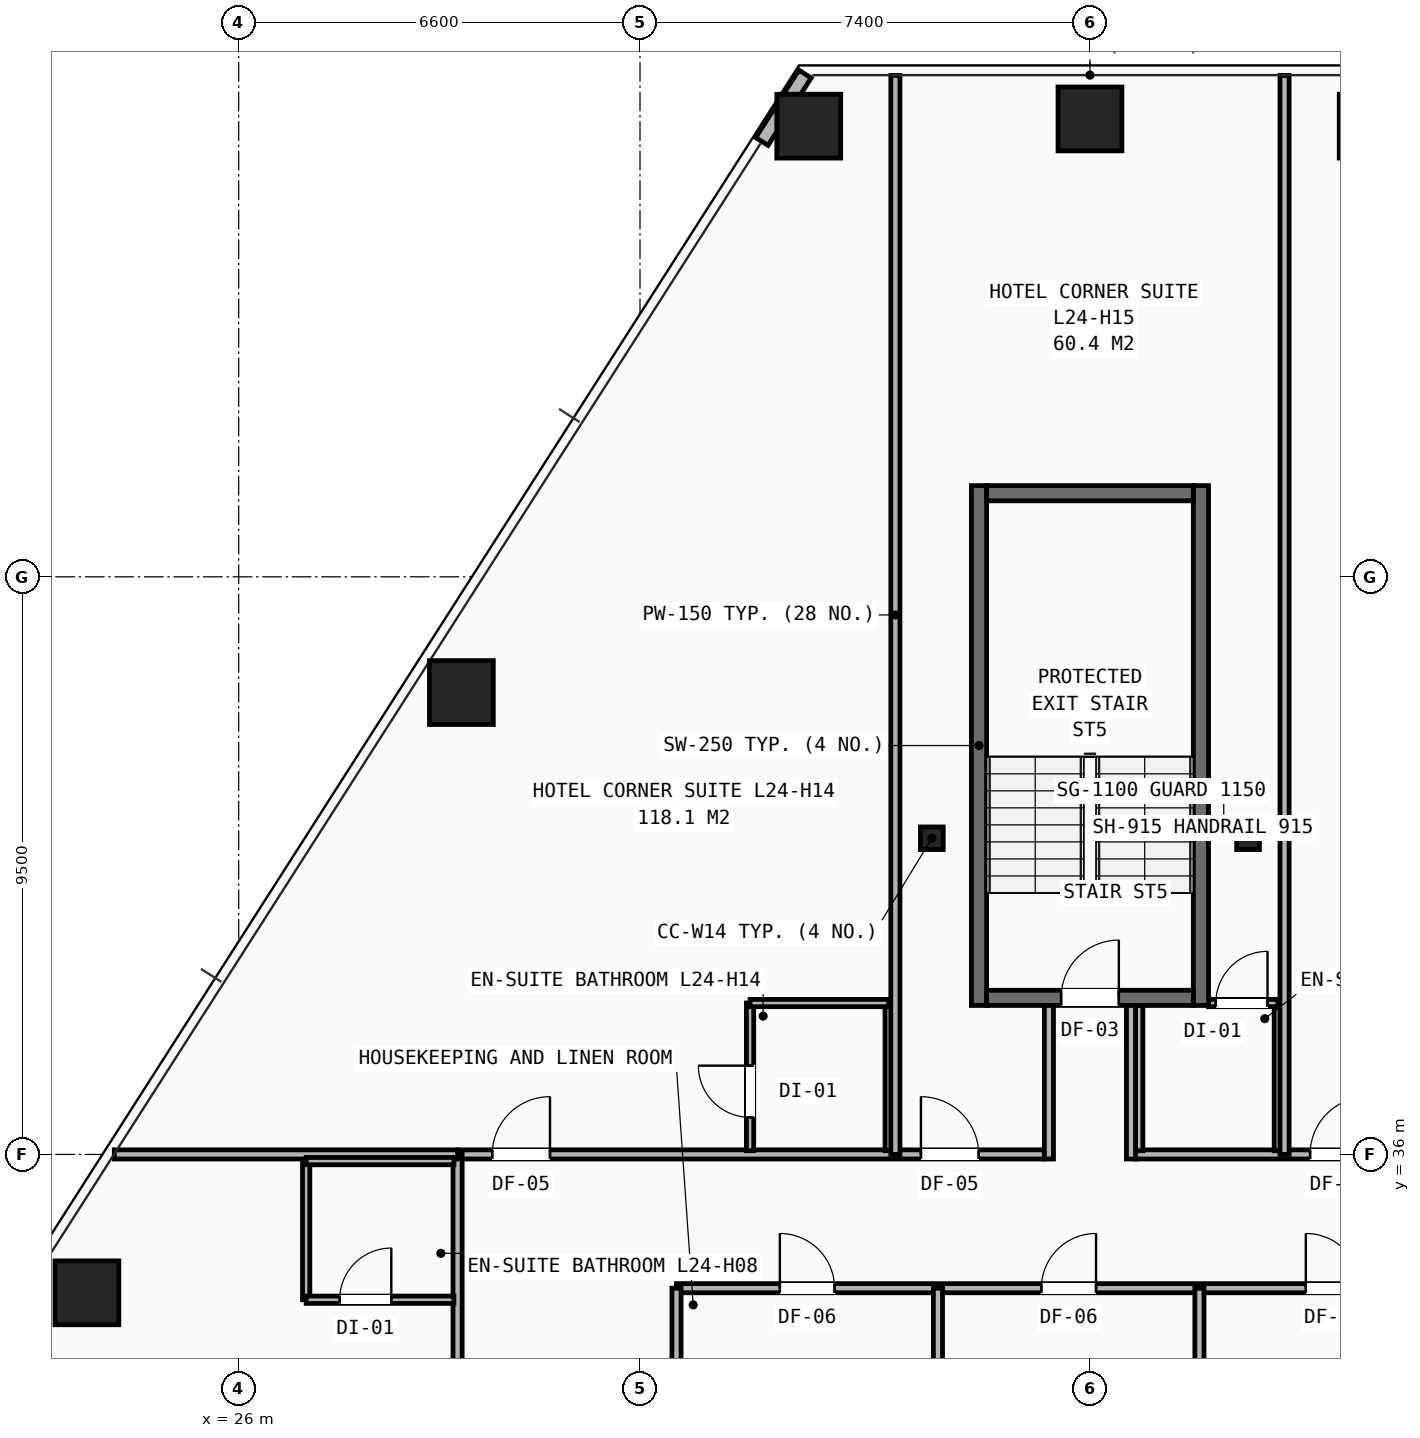
"""IFC4 building model, lengths in metres.
Left out: names, types, materials, properties, quantities, classifications, styles, units other than length and angle.
Written with IfcOpenShell. Run it as: python <this file> out.ifc"""

import sys

from ifc_helpers import new_model, si_unit, direction, frame, frame_2d, origin, origin_2d, place, context, subcontext, project, spatial, rectangle, hollow_rectangle, i_section, extrude, element, fill, save


model = new_model("IFC4")
c1 = context("Model", 3, precision=1e-05, world=origin(), true_north=direction((0.0, 1.0)))
c2 = subcontext(c1, "Body", "Model", "MODEL_VIEW")
j1 = project(units=[si_unit("LENGTHUNIT", "METRE"), si_unit("PLANEANGLEUNIT", "RADIAN")], contexts=[c1])
p1 = place(None, origin())
s1 = spatial("IfcSite", under=j1, at=p1, CompositionType="ELEMENT")
p2 = place(p1, origin())
s2 = spatial("IfcBuilding", under=s1, at=p2, CompositionType="ELEMENT")
p3 = place(p2, frame((0.0, 0.0, 86.2)))
s3 = spatial("IfcBuildingStorey", under=s2, at=p3, CompositionType="ELEMENT", Elevation=86.2)
for number, where, z_axis, x_axis in (
    (1, (37.4, 41.2, 0.0), (0.0, 0.0, 1.0), (1.0, 0.0, 0.0)),
    (2, (42.6, 41.2, 0.0), (0.0, 0.0, 1.0), (1.0, 0.0, 0.0)),
):
    element("IfcColumn", number, at=place(p3, frame(where, z_axis=z_axis, x_axis=x_axis)), inside=s3, PredefinedType="COLUMN", context=c2, shape_type="SweptSolid", body=[
        extrude(i_section(OverallWidth=0.374, OverallDepth=0.372, WebThickness=0.016, FlangeThickness=0.026, at=origin_2d()), origin(), (0.0, 0.0, 1.0), 3.2),
    ])
for number, where, z_axis, x_axis in (
    (3, (44.625, 52.912, 0.0), (0.0, 0.0, 1.0), (1.0, 0.0, 0.0)),
    (4, (40.0, 53.031, 0.0), (0.0, 0.0, 1.0), (1.0, 0.0, 0.0)),
    (5, (35.375, 52.912, 0.0), (0.0, 0.0, 1.0), (1.0, 0.0, 0.0)),
    (6, (29.662, 43.596, 0.0), (0.0, 0.0, 1.0), (1.0, 0.0, 0.0)),
    (7, (23.504, 33.724, 0.0), (0.0, 0.0, 1.0), (1.0, 0.0, 0.0)),
):
    element("IfcColumn", number, at=place(p3, frame(where, z_axis=z_axis, x_axis=x_axis)), inside=s3, PredefinedType="COLUMN", context=c2, shape_type="SweptSolid", body=[
        extrude(hollow_rectangle(XDim=1.05, YDim=1.05, WallThickness=0.07, at=origin_2d()), origin(), (0.0, 0.0, 1.0), 3.2),
    ])
p4 = place(p3, frame((35.314, 53.769, 0.0), z_axis=(0.0, 0.0, 1.0), x_axis=(-0.538937912301, -0.842345491283, 0.0)))
e8 = element("IfcWall", 8, at=p4, inside=s3, PredefinedType="SHEAR", context=c2, shape_type="SweptSolid", body=[
    extrude(rectangle(XDim=1.316, YDim=0.24, at=frame_2d((0.658, 0.0))), origin(), (0.0, 0.0, 1.0), 2.253),
])
p5 = place(p3, frame((33.2, 33.8, 0.0), z_axis=(0.0, 0.0, 1.0), x_axis=(1.0, 0.0, 0.0)))
e9 = element("IfcWall", 9, at=p5, inside=s3, PredefinedType="PARTITIONING", context=c2, shape_type="SweptSolid", body=[
    extrude(rectangle(XDim=13.0, YDim=0.15, at=frame_2d((6.5, 0.0))), origin(), (0.0, 0.0, 1.0), 2.97),
])
p6 = place(p5, frame((1.7, 0.0, 0.0)))
e10 = element("IfcOpeningElement", 10, at=p6, cuts=e9, PredefinedType="OPENING", context=c2, shape_type="SweptSolid", body=[
    extrude(rectangle(XDim=0.9, YDim=2.1, at=frame_2d((0.45, 1.05))), frame((0.0, 0.085, 0.0), z_axis=(0.0, -1.0, 0.0), x_axis=(1.0, 0.0, 0.0)), (0.0, 0.0, 1.0), 0.17),
])
p7 = place(p5, frame((6.0, 0.0, 0.0)))
e11 = element("IfcOpeningElement", 11, at=p7, cuts=e9, PredefinedType="OPENING", context=c2, shape_type="SweptSolid", body=[
    extrude(rectangle(XDim=0.9, YDim=2.1, at=frame_2d((0.45, 1.05))), frame((0.0, 0.085, 0.0), z_axis=(0.0, -1.0, 0.0), x_axis=(1.0, 0.0, 0.0)), (0.0, 0.0, 1.0), 0.17),
])
p8 = place(p5, frame((10.35, 0.0, 0.0)))
e12 = element("IfcOpeningElement", 12, at=p8, cuts=e9, PredefinedType="OPENING", context=c2, shape_type="SweptSolid", body=[
    extrude(rectangle(XDim=0.9, YDim=2.1, at=frame_2d((0.45, 1.05))), frame((0.0, 0.085, 0.0), z_axis=(0.0, -1.0, 0.0), x_axis=(1.0, 0.0, 0.0)), (0.0, 0.0, 1.0), 0.17),
])
for number, where, z_axis, x_axis in (
    (13, (33.2, 31.2, 0.0), (0.0, 0.0, 1.0), (0.0, 1.0, 0.0)),
    (14, (37.5, 31.2, 0.0), (0.0, 0.0, 1.0), (0.0, 1.0, 0.0)),
    (15, (41.8, 31.2, 0.0), (0.0, 0.0, 1.0), (0.0, 1.0, 0.0)),
):
    element("IfcWall", number, at=place(p3, frame(where, z_axis=z_axis, x_axis=x_axis)), inside=s3, PredefinedType="PARTITIONING", context=c2, shape_type="SweptSolid", body=[
        extrude(rectangle(XDim=2.6, YDim=0.15, at=frame_2d((1.3, 0.0))), origin(), (0.0, 0.0, 1.0), 2.421),
    ])
p9 = place(p3, frame((29.6, 36.0, 0.0), z_axis=(0.0, 0.0, 1.0), x_axis=(1.0, 0.0, 0.0)))
e16 = element("IfcWall", 16, at=p9, inside=s3, PredefinedType="PARTITIONING", context=c2, shape_type="SweptSolid", body=[
    extrude(rectangle(XDim=9.65, YDim=0.15, at=frame_2d((4.825, 0.0))), origin(), (0.0, 0.0, 1.0), 2.503),
])
p10 = place(p9, frame((0.57, 0.0, 0.0)))
e17 = element("IfcOpeningElement", 17, at=p10, cuts=e16, PredefinedType="OPENING", context=c2, shape_type="SweptSolid", body=[
    extrude(rectangle(XDim=0.95, YDim=2.1, at=frame_2d((0.475, 1.05))), frame((0.0, 0.085, 0.0), z_axis=(0.0, -1.0, 0.0), x_axis=(1.0, 0.0, 0.0)), (0.0, 0.0, 1.0), 0.17),
])
p11 = place(p9, frame((7.62, 0.0, 0.0)))
e18 = element("IfcOpeningElement", 18, at=p11, cuts=e16, PredefinedType="OPENING", context=c2, shape_type="SweptSolid", body=[
    extrude(rectangle(XDim=0.95, YDim=2.1, at=frame_2d((0.475, 1.05))), frame((0.0, 0.085, 0.0), z_axis=(0.0, -1.0, 0.0), x_axis=(1.0, 0.0, 0.0)), (0.0, 0.0, 1.0), 0.17),
])
p12 = place(p3, frame((40.75, 36.0, 0.0), z_axis=(0.0, 0.0, 1.0), x_axis=(1.0, 0.0, 0.0)))
e19 = element("IfcWall", 19, at=p12, inside=s3, PredefinedType="PARTITIONING", context=c2, shape_type="SweptSolid", body=[
    extrude(rectangle(XDim=9.65, YDim=0.15, at=frame_2d((4.825, 0.0))), origin(), (0.0, 0.0, 1.0), 2.503),
])
p13 = place(p12, frame((2.87, 0.0, 0.0)))
e20 = element("IfcOpeningElement", 20, at=p13, cuts=e19, PredefinedType="OPENING", context=c2, shape_type="SweptSolid", body=[
    extrude(rectangle(XDim=0.95, YDim=2.1, at=frame_2d((0.475, 1.05))), frame((0.0, 0.085, 0.0), z_axis=(0.0, -1.0, 0.0), x_axis=(1.0, 0.0, 0.0)), (0.0, 0.0, 1.0), 0.17),
])
p14 = place(p3, frame((29.6, 14.1, 0.0), z_axis=(0.0, 0.0, 1.0), x_axis=(0.0, 1.0, 0.0)))
e21 = element("IfcWall", 21, at=p14, inside=s3, PredefinedType="PARTITIONING", context=c2, shape_type="SweptSolid", body=[
    extrude(rectangle(XDim=21.9, YDim=0.15, at=frame_2d((10.95, 0.0))), origin(), (0.0, 0.0, 1.0), 2.421),
])
p15 = place(p14, frame((0.42, 0.0, 0.0)))
e22 = element("IfcOpeningElement", 22, at=p15, cuts=e21, PredefinedType="OPENING", context=c2, shape_type="SweptSolid", body=[
    extrude(rectangle(XDim=0.95, YDim=2.1, at=frame_2d((0.475, 1.05))), frame((0.0, 0.085, 0.0), z_axis=(0.0, -1.0, 0.0), x_axis=(1.0, 0.0, 0.0)), (0.0, 0.0, 1.0), 0.17),
])
p16 = place(p14, frame((5.52, 0.0, 0.0)))
e23 = element("IfcOpeningElement", 23, at=p16, cuts=e21, PredefinedType="OPENING", context=c2, shape_type="SweptSolid", body=[
    extrude(rectangle(XDim=0.95, YDim=2.1, at=frame_2d((0.475, 1.05))), frame((0.0, 0.085, 0.0), z_axis=(0.0, -1.0, 0.0), x_axis=(1.0, 0.0, 0.0)), (0.0, 0.0, 1.0), 0.17),
])
p17 = place(p14, frame((10.92, 0.0, 0.0)))
e24 = element("IfcOpeningElement", 24, at=p17, cuts=e21, PredefinedType="OPENING", context=c2, shape_type="SweptSolid", body=[
    extrude(rectangle(XDim=0.95, YDim=2.1, at=frame_2d((0.475, 1.05))), frame((0.0, 0.085, 0.0), z_axis=(0.0, -1.0, 0.0), x_axis=(1.0, 0.0, 0.0)), (0.0, 0.0, 1.0), 0.17),
])
p18 = place(p14, frame((16.52, 0.0, 0.0)))
e25 = element("IfcOpeningElement", 25, at=p18, cuts=e21, PredefinedType="OPENING", context=c2, shape_type="SweptSolid", body=[
    extrude(rectangle(XDim=0.95, YDim=2.1, at=frame_2d((0.475, 1.05))), frame((0.0, 0.085, 0.0), z_axis=(0.0, -1.0, 0.0), x_axis=(1.0, 0.0, 0.0)), (0.0, 0.0, 1.0), 0.17),
])
p19 = place(p3, frame((23.955, 36.0, 0.0), z_axis=(0.0, 0.0, 1.0), x_axis=(1.0, 0.0, 0.0)))
e26 = element("IfcWall", 26, at=p19, inside=s3, PredefinedType="PARTITIONING", context=c2, shape_type="SweptSolid", body=[
    extrude(rectangle(XDim=5.645, YDim=0.15, at=frame_2d((2.823, 0.0))), origin(), (0.0, 0.0, 1.0), 2.258),
])
p20 = place(p3, frame((27.11, 33.61, 0.0), z_axis=(0.0, 0.0, 1.0), x_axis=(0.0, 1.0, 0.0)))
e27 = element("IfcWall", 27, at=p20, inside=s3, PredefinedType="PARTITIONING", context=c2, shape_type="SweptSolid", body=[
    extrude(rectangle(XDim=2.28, YDim=0.12, at=frame_2d((1.14, 0.0))), origin(), (0.0, 0.0, 1.0), 2.97),
])
p21 = place(p3, frame((27.11, 33.61, 0.0), z_axis=(0.0, 0.0, 1.0), x_axis=(1.0, 0.0, 0.0)))
e28 = element("IfcWall", 28, at=p21, inside=s3, PredefinedType="PARTITIONING", context=c2, shape_type="SweptSolid", body=[
    extrude(rectangle(XDim=2.43, YDim=0.12, at=frame_2d((1.215, 0.0))), origin(), (0.0, 0.0, 1.0), 2.503),
])
p22 = place(p21, frame((0.55, 0.0, 0.0)))
e29 = element("IfcOpeningElement", 29, at=p22, cuts=e28, PredefinedType="OPENING", context=c2, shape_type="SweptSolid", body=[
    extrude(rectangle(XDim=0.85, YDim=2.05, at=frame_2d((0.425, 1.025))), frame((0.0, 0.07, 0.0), z_axis=(0.0, -1.0, 0.0), x_axis=(1.0, 0.0, 0.0)), (0.0, 0.0, 1.0), 0.14),
])
p23 = place(p3, frame((27.11, 35.89, 0.0), z_axis=(0.0, 0.0, 1.0), x_axis=(1.0, 0.0, 0.0)))
e30 = element("IfcWall", 30, at=p23, inside=s3, PredefinedType="PARTITIONING", context=c2, shape_type="SweptSolid", body=[
    extrude(rectangle(XDim=2.43, YDim=0.12, at=frame_2d((1.215, 0.0))), origin(), (0.0, 0.0, 1.0), 2.503),
])
p24 = place(p3, frame((34.41, 36.06, 0.0), z_axis=(0.0, 0.0, 1.0), x_axis=(0.0, 1.0, 0.0)))
e31 = element("IfcWall", 31, at=p24, inside=s3, PredefinedType="PARTITIONING", context=c2, shape_type="SweptSolid", body=[
    extrude(rectangle(XDim=2.43, YDim=0.12, at=frame_2d((1.215, 0.0))), origin(), (0.0, 0.0, 1.0), 2.97),
])
p25 = place(p24, frame((0.55, 0.0, 0.0)))
e32 = element("IfcOpeningElement", 32, at=p25, cuts=e31, PredefinedType="OPENING", context=c2, shape_type="SweptSolid", body=[
    extrude(rectangle(XDim=0.85, YDim=2.05, at=frame_2d((0.425, 1.025))), frame((0.0, 0.07, 0.0), z_axis=(0.0, -1.0, 0.0), x_axis=(1.0, 0.0, 0.0)), (0.0, 0.0, 1.0), 0.14),
])
p26 = place(p3, frame((36.69, 36.06, 0.0), z_axis=(0.0, 0.0, 1.0), x_axis=(0.0, 1.0, 0.0)))
e33 = element("IfcWall", 33, at=p26, inside=s3, PredefinedType="PARTITIONING", context=c2, shape_type="SweptSolid", body=[
    extrude(rectangle(XDim=2.43, YDim=0.12, at=frame_2d((1.215, 0.0))), origin(), (0.0, 0.0, 1.0), 2.97),
])
p27 = place(p3, frame((34.41, 38.49, 0.0), z_axis=(0.0, 0.0, 1.0), x_axis=(1.0, 0.0, 0.0)))
e34 = element("IfcWall", 34, at=p27, inside=s3, PredefinedType="PARTITIONING", context=c2, shape_type="SweptSolid", body=[
    extrude(rectangle(XDim=2.28, YDim=0.12, at=frame_2d((1.14, 0.0))), origin(), (0.0, 0.0, 1.0), 2.97),
])
p28 = place(p3, frame((36.8, 36.0, 0.0), z_axis=(0.0, 0.0, 1.0), x_axis=(0.0, 1.0, 0.0)))
e35 = element("IfcWall", 35, at=p28, inside=s3, PredefinedType="PARTITIONING", context=c2, shape_type="SweptSolid", body=[
    extrude(rectangle(XDim=17.746, YDim=0.15, at=frame_2d((8.873, 0.0))), origin(), (0.0, 0.0, 1.0), 2.258),
])
p29 = place(p3, frame((40.81, 36.06, 0.0), z_axis=(0.0, 0.0, 1.0), x_axis=(0.0, 1.0, 0.0)))
e36 = element("IfcWall", 36, at=p29, inside=s3, PredefinedType="PARTITIONING", context=c2, shape_type="SweptSolid", body=[
    extrude(rectangle(XDim=2.39, YDim=0.12, at=frame_2d((1.195, 0.0))), origin(), (0.0, 0.0, 1.0), 2.97),
])
p30 = place(p3, frame((43.09, 36.06, 0.0), z_axis=(0.0, 0.0, 1.0), x_axis=(0.0, 1.0, 0.0)))
e37 = element("IfcWall", 37, at=p30, inside=s3, PredefinedType="PARTITIONING", context=c2, shape_type="SweptSolid", body=[
    extrude(rectangle(XDim=2.43, YDim=0.12, at=frame_2d((1.215, 0.0))), origin(), (0.0, 0.0, 1.0), 2.97),
])
p31 = place(p3, frame((41.95, 38.49, 0.0), z_axis=(0.0, 0.0, 1.0), x_axis=(1.0, 0.0, 0.0)))
e38 = element("IfcWall", 38, at=p31, inside=s3, PredefinedType="PARTITIONING", context=c2, shape_type="SweptSolid", body=[
    extrude(rectangle(XDim=1.14, YDim=0.12, at=frame_2d((0.57, 0.0))), origin(), (0.0, 0.0, 1.0), 2.97),
])
p32 = place(p31, frame((0.12, 0.0, 0.0)))
e39 = element("IfcOpeningElement", 39, at=p32, cuts=e38, PredefinedType="OPENING", context=c2, shape_type="SweptSolid", body=[
    extrude(rectangle(XDim=0.85, YDim=2.05, at=frame_2d((0.425, 1.025))), frame((0.0, 0.07, 0.0), z_axis=(0.0, -1.0, 0.0), x_axis=(1.0, 0.0, 0.0)), (0.0, 0.0, 1.0), 0.14),
])
p33 = place(p3, frame((43.2, 36.0, 0.0), z_axis=(0.0, 0.0, 1.0), x_axis=(0.0, 1.0, 0.0)))
e40 = element("IfcWall", 40, at=p33, inside=s3, PredefinedType="PARTITIONING", context=c2, shape_type="SweptSolid", body=[
    extrude(rectangle(XDim=17.746, YDim=0.15, at=frame_2d((8.873, 0.0))), origin(), (0.0, 0.0, 1.0), 2.258),
])
for number, where, z_axis, x_axis in (
    (41, (38.175, 38.45, 0.0), (0.0, 0.0, 1.0), (0.0, 1.0, 0.0)),
    (42, (41.825, 38.45, 0.0), (0.0, 0.0, 1.0), (0.0, 1.0, 0.0)),
):
    element("IfcWall", number, at=place(p3, frame(where, z_axis=z_axis, x_axis=x_axis)), inside=s3, PredefinedType="SHEAR", context=c2, shape_type="SweptSolid", body=[
        extrude(rectangle(XDim=8.55, YDim=0.25, at=frame_2d((4.275, 0.0))), origin(), (0.0, 0.0, 1.0), 2.97),
    ])
p34 = place(p3, frame((38.3, 38.575, 0.0), z_axis=(0.0, 0.0, 1.0), x_axis=(1.0, 0.0, 0.0)))
e43 = element("IfcWall", 43, at=p34, inside=s3, PredefinedType="SHEAR", context=c2, shape_type="SweptSolid", body=[
    extrude(rectangle(XDim=3.4, YDim=0.25, at=frame_2d((1.7, 0.0))), origin(), (0.0, 0.0, 1.0), 2.97),
])
p35 = place(p34, frame((1.225, 0.0, 0.0)))
e44 = element("IfcOpeningElement", 44, at=p35, cuts=e43, PredefinedType="OPENING", context=c2, shape_type="SweptSolid", body=[
    extrude(rectangle(XDim=0.95, YDim=2.1, at=frame_2d((0.475, 1.05))), frame((0.0, 0.135, 0.0), z_axis=(0.0, -1.0, 0.0), x_axis=(1.0, 0.0, 0.0)), (0.0, 0.0, 1.0), 0.27),
])
p36 = place(p3, frame((38.3, 46.875, 0.0), z_axis=(0.0, 0.0, 1.0), x_axis=(1.0, 0.0, 0.0)))
e45 = element("IfcWall", 45, at=p36, inside=s3, PredefinedType="SHEAR", context=c2, shape_type="SweptSolid", body=[
    extrude(rectangle(XDim=3.4, YDim=0.25, at=frame_2d((1.7, 0.0))), origin(), (0.0, 0.0, 1.0), 2.97),
])
for number, where, z_axis, x_axis in (
    (46, (39.325, 35.925, 0.0), (0.0, 0.0, 1.0), (0.0, 1.0, 0.0)),
    (47, (40.675, 35.925, 0.0), (0.0, 0.0, 1.0), (0.0, 1.0, 0.0)),
):
    element("IfcWall", number, at=place(p3, frame(where, z_axis=z_axis, x_axis=x_axis)), inside=s3, PredefinedType="PARTITIONING", context=c2, shape_type="SweptSolid", body=[
        extrude(rectangle(XDim=2.525, YDim=0.15, at=frame_2d((1.262, 0.0))), origin(), (0.0, 0.0, 1.0), 2.97),
    ])
p37 = place(p6, origin())
e48 = element("IfcDoor", 48, at=p37, inside=s3, OperationType="SINGLE_SWING_LEFT", PredefinedType="DOOR", context=c2, shape_type="SweptSolid", body=[
    extrude(rectangle(XDim=0.9, YDim=2.1, at=frame_2d((0.45, 1.05))), frame((0.0, 0.025, 0.0), z_axis=(0.0, -1.0, 0.0), x_axis=(1.0, 0.0, 0.0)), (0.0, 0.0, 1.0), 0.05),
])
fill(e10, e48)
p38 = place(p7, origin())
e49 = element("IfcDoor", 49, at=p38, inside=s3, OperationType="SINGLE_SWING_RIGHT", PredefinedType="DOOR", context=c2, shape_type="SweptSolid", body=[
    extrude(rectangle(XDim=0.9, YDim=2.1, at=frame_2d((0.45, 1.05))), frame((0.0, 0.025, 0.0), z_axis=(0.0, -1.0, 0.0), x_axis=(1.0, 0.0, 0.0)), (0.0, 0.0, 1.0), 0.05),
])
fill(e11, e49)
p39 = place(p8, origin())
e50 = element("IfcDoor", 50, at=p39, inside=s3, OperationType="SINGLE_SWING_LEFT", PredefinedType="DOOR", context=c2, shape_type="SweptSolid", body=[
    extrude(rectangle(XDim=0.9, YDim=2.1, at=frame_2d((0.45, 1.05))), frame((0.0, 0.025, 0.0), z_axis=(0.0, -1.0, 0.0), x_axis=(1.0, 0.0, 0.0)), (0.0, 0.0, 1.0), 0.05),
])
fill(e12, e50)
p40 = place(p22, origin())
e51 = element("IfcDoor", 51, at=p40, inside=s3, OperationType="SINGLE_SWING_RIGHT", PredefinedType="DOOR", context=c2, shape_type="SweptSolid", body=[
    extrude(rectangle(XDim=0.85, YDim=2.05, at=frame_2d((0.425, 1.025))), frame((0.0, 0.025, 0.0), z_axis=(0.0, -1.0, 0.0), x_axis=(1.0, 0.0, 0.0)), (0.0, 0.0, 1.0), 0.05),
])
fill(e29, e51)
p41 = place(p10, origin())
e52 = element("IfcDoor", 52, at=p41, inside=s3, OperationType="SINGLE_SWING_RIGHT", PredefinedType="DOOR", context=c2, shape_type="SweptSolid", body=[
    extrude(rectangle(XDim=0.95, YDim=2.1, at=frame_2d((0.475, 1.05))), frame((0.0, 0.025, 0.0), z_axis=(0.0, -1.0, 0.0), x_axis=(1.0, 0.0, 0.0)), (0.0, 0.0, 1.0), 0.05),
])
fill(e17, e52)
p42 = place(p25, origin())
e53 = element("IfcDoor", 53, at=p42, inside=s3, OperationType="SINGLE_SWING_RIGHT", PredefinedType="DOOR", context=c2, shape_type="SweptSolid", body=[
    extrude(rectangle(XDim=0.85, YDim=2.05, at=frame_2d((0.425, 1.025))), frame((0.0, 0.025, 0.0), z_axis=(0.0, -1.0, 0.0), x_axis=(1.0, 0.0, 0.0)), (0.0, 0.0, 1.0), 0.05),
])
fill(e32, e53)
p43 = place(p11, origin())
e54 = element("IfcDoor", 54, at=p43, inside=s3, OperationType="SINGLE_SWING_LEFT", PredefinedType="DOOR", context=c2, shape_type="SweptSolid", body=[
    extrude(rectangle(XDim=0.95, YDim=2.1, at=frame_2d((0.475, 1.05))), frame((0.0, 0.025, 0.0), z_axis=(0.0, -1.0, 0.0), x_axis=(1.0, 0.0, 0.0)), (0.0, 0.0, 1.0), 0.05),
])
fill(e18, e54)
p44 = place(p32, origin())
e55 = element("IfcDoor", 55, at=p44, inside=s3, OperationType="SINGLE_SWING_RIGHT", PredefinedType="DOOR", context=c2, shape_type="SweptSolid", body=[
    extrude(rectangle(XDim=0.85, YDim=2.05, at=frame_2d((0.425, 1.025))), frame((0.0, 0.025, 0.0), z_axis=(0.0, -1.0, 0.0), x_axis=(1.0, 0.0, 0.0)), (0.0, 0.0, 1.0), 0.05),
])
fill(e39, e55)
p45 = place(p13, origin())
e56 = element("IfcDoor", 56, at=p45, inside=s3, OperationType="SINGLE_SWING_RIGHT", PredefinedType="DOOR", context=c2, shape_type="SweptSolid", body=[
    extrude(rectangle(XDim=0.95, YDim=2.1, at=frame_2d((0.475, 1.05))), frame((0.0, 0.025, 0.0), z_axis=(0.0, -1.0, 0.0), x_axis=(1.0, 0.0, 0.0)), (0.0, 0.0, 1.0), 0.05),
])
fill(e20, e56)
p46 = place(p35, origin())
e57 = element("IfcDoor", 57, at=p46, inside=s3, OperationType="SINGLE_SWING_RIGHT", PredefinedType="DOOR", context=c2, shape_type="SweptSolid", body=[
    extrude(rectangle(XDim=0.95, YDim=2.1, at=frame_2d((0.475, 1.05))), frame((0.0, 0.025, 0.0), z_axis=(0.0, -1.0, 0.0), x_axis=(1.0, 0.0, 0.0)), (0.0, 0.0, 1.0), 0.05),
])
fill(e44, e57)
save(model, sys.argv[1])
